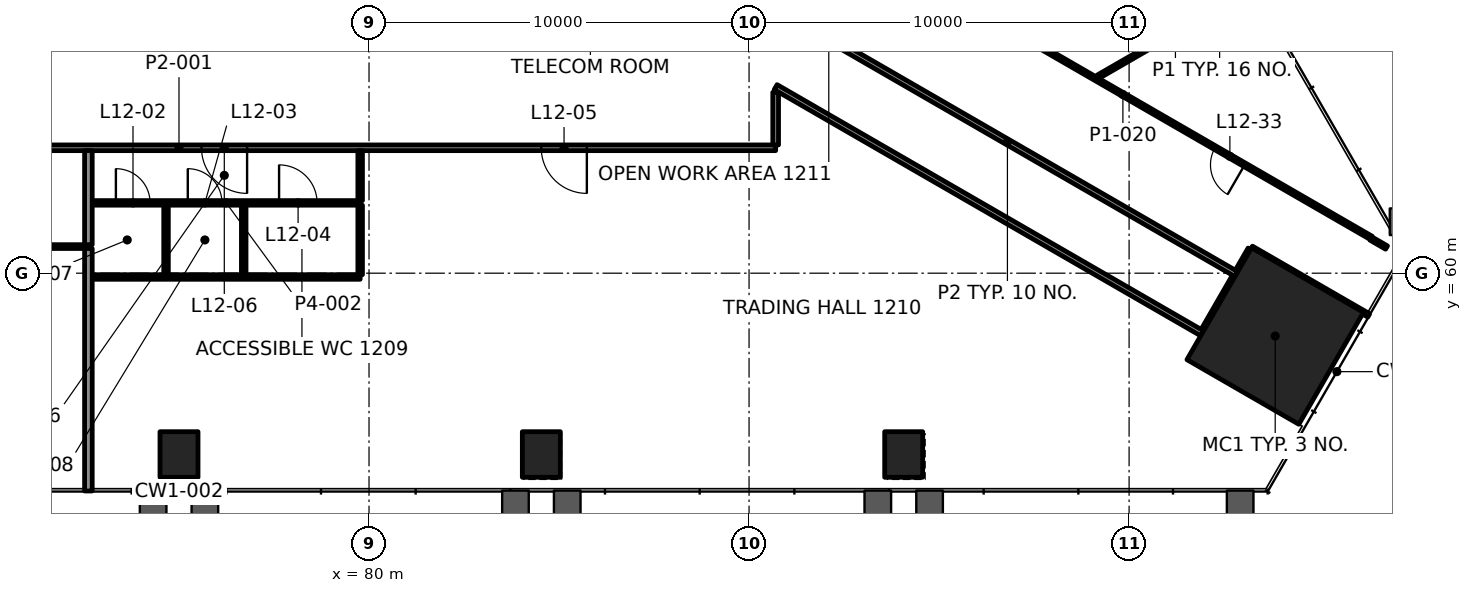
"""IFC4 building model, lengths in metres.
Left out: names, types, materials, properties, quantities, classifications, styles, units other than length and angle.
Written with IfcOpenShell. Run it as: python <this file> out.ifc"""

import sys

from ifc_helpers import new_model, si_unit, direction, frame, frame_2d, origin, origin_2d, place, context, subcontext, project, spatial, rectangle, extrude, element, fill, save


model = new_model("IFC4")
c1 = context("Model", 3, precision=1e-05, world=origin(), true_north=direction((0.0, 1.0)))
c2 = subcontext(c1, "Body", "Model", "MODEL_VIEW")
j1 = project(units=[si_unit("LENGTHUNIT", "METRE"), si_unit("PLANEANGLEUNIT", "RADIAN")], contexts=[c1])
p1 = place(None, origin())
s1 = spatial("IfcSite", under=j1, at=p1, CompositionType="ELEMENT")
p2 = place(p1, origin())
s2 = spatial("IfcBuilding", under=s1, at=p2, CompositionType="ELEMENT")
p3 = place(p2, frame((0.0, 0.0, 56.8)))
s3 = spatial("IfcBuildingStorey", under=s2, at=p3, CompositionType="ELEMENT", Elevation=56.8)
p4 = place(p3, frame((103.844, 58.347, 0.0), z_axis=(0.0, 0.0, 1.0), x_axis=(0.5, 0.866025403784, 0.0)))
e1 = element("IfcColumn", 1, at=p4, inside=s3, PredefinedType="COLUMN", context=c2, shape_type="SweptSolid", body=[
    extrude(rectangle(XDim=3.4, YDim=3.4, at=origin_2d()), origin(), (0.0, 0.0, 1.0), 4.2),
])
for number, where, z_axis, x_axis in (
    (2, (75.0, 55.229, -0.0), (0.0, 0.0, 1.0), (1.0, 0.0, 0.0)),
    (3, (84.534, 55.229, -0.0), (0.0, 0.0, 1.0), (1.0, 0.0, 0.0)),
    (4, (94.069, 55.229, -0.0), (0.0, 0.0, 1.0), (1.0, 0.0, 0.0)),
):
    element("IfcColumn", number, at=place(p3, frame(where, z_axis=z_axis, x_axis=x_axis)), inside=s3, PredefinedType="COLUMN", context=c2, shape_type="SweptSolid", body=[
        extrude(rectangle(XDim=1.0, YDim=1.2, at=origin_2d()), origin(), (0.0, 0.0, 1.0), 4.2),
    ])
p5 = place(p3, frame((72.717, 59.9, 0.0), z_axis=(0.0, 0.0, 1.0), x_axis=(1.0, 0.0, 0.0)))
e5 = element("IfcWall", 5, at=p5, inside=s3, PredefinedType="PARTITIONING", context=c2, shape_type="SweptSolid", body=[
    extrude(rectangle(XDim=7.05, YDim=0.12, at=frame_2d((3.525, 0.0))), origin(), (0.0, 0.0, 1.0), 3.4),
])
p6 = place(p3, frame((57.232, 60.7, 0.0), z_axis=(0.0, 0.0, 1.0), x_axis=(1.0, 0.0, 0.0)))
e6 = element("IfcWall", 6, at=p6, inside=s3, PredefinedType="PARTITIONING", context=c2, shape_type="SweptSolid", body=[
    extrude(rectangle(XDim=15.385, YDim=0.1, at=frame_2d((7.692, 0.0))), origin(), (0.0, 0.0, 1.0), 3.4),
])
p7 = place(p6, frame((7.192, 0.0, 0.0)))
e7 = element("IfcOpeningElement", 7, at=p7, cuts=e6, PredefinedType="OPENING", context=c2, shape_type="SweptSolid", body=[
    extrude(rectangle(XDim=1.0, YDim=2.1, at=frame_2d((0.5, 1.05))), frame((0.0, 0.06, 0.0), z_axis=(0.0, -1.0, 0.0), x_axis=(1.0, 0.0, 0.0)), (0.0, 0.0, 1.0), 0.12),
])
p8 = place(p3, frame((72.716, 61.85, 0.0), z_axis=(0.0, 0.0, 1.0), x_axis=(1.0, 0.0, 0.0)))
e8 = element("IfcWall", 8, at=p8, inside=s3, PredefinedType="PARTITIONING", context=c2, shape_type="SweptSolid", body=[
    extrude(rectangle(XDim=7.051, YDim=0.12, at=frame_2d((3.525, 0.0))), origin(), (0.0, 0.0, 1.0), 3.4),
])
p9 = place(p8, frame((0.623, 0.0, 0.0)))
e9 = element("IfcOpeningElement", 9, at=p9, cuts=e8, PredefinedType="OPENING", context=c2, shape_type="SweptSolid", body=[
    extrude(rectangle(XDim=0.9, YDim=2.1, at=frame_2d((0.45, 1.05))), frame((0.0, 0.07, 0.0), z_axis=(0.0, -1.0, 0.0), x_axis=(1.0, 0.0, 0.0)), (0.0, 0.0, 1.0), 0.14),
])
p10 = place(p8, frame((2.515, 0.0, 0.0)))
e10 = element("IfcOpeningElement", 10, at=p10, cuts=e8, PredefinedType="OPENING", context=c2, shape_type="SweptSolid", body=[
    extrude(rectangle(XDim=0.9, YDim=2.1, at=frame_2d((0.45, 1.05))), frame((0.0, 0.07, 0.0), z_axis=(0.0, -1.0, 0.0), x_axis=(1.0, 0.0, 0.0)), (0.0, 0.0, 1.0), 0.14),
])
p11 = place(p8, frame((4.917, 0.0, 0.0)))
e11 = element("IfcOpeningElement", 11, at=p11, cuts=e8, PredefinedType="OPENING", context=c2, shape_type="SweptSolid", body=[
    extrude(rectangle(XDim=1.0, YDim=2.1, at=frame_2d((0.5, 1.05))), frame((0.0, 0.07, 0.0), z_axis=(0.0, -1.0, 0.0), x_axis=(1.0, 0.0, 0.0)), (0.0, 0.0, 1.0), 0.14),
])
p12 = place(p3, frame((90.699, 63.3, 0.0), z_axis=(0.0, 0.0, 1.0), x_axis=(-1.0, 0.0, 0.0)))
e12 = element("IfcWall", 12, at=p12, inside=s3, PredefinedType="PARTITIONING", context=c2, shape_type="SweptSolid", body=[
    extrude(rectangle(XDim=31.399, YDim=0.15, at=frame_2d((15.7, 0.0))), origin(), (0.0, 0.0, 1.0), 3.4),
])
p13 = place(p12, frame((4.968, 0.0, 0.0)))
e13 = element("IfcOpeningElement", 13, at=p13, cuts=e12, PredefinedType="OPENING", context=c2, shape_type="SweptSolid", body=[
    extrude(rectangle(XDim=1.2, YDim=2.1, at=frame_2d((0.6, 1.05))), frame((0.0, 0.085, 0.0), z_axis=(0.0, -1.0, 0.0), x_axis=(1.0, 0.0, 0.0)), (0.0, 0.0, 1.0), 0.17),
])
p14 = place(p12, frame((13.908, 0.0, 0.0)))
e14 = element("IfcOpeningElement", 14, at=p14, cuts=e12, PredefinedType="OPENING", context=c2, shape_type="SweptSolid", body=[
    extrude(rectangle(XDim=1.2, YDim=2.1, at=frame_2d((0.6, 1.05))), frame((0.0, 0.085, 0.0), z_axis=(0.0, -1.0, 0.0), x_axis=(1.0, 0.0, 0.0)), (0.0, 0.0, 1.0), 0.17),
])
p15 = place(p12, frame((24.14, 0.0, 0.0)))
e15 = element("IfcOpeningElement", 15, at=p15, cuts=e12, PredefinedType="OPENING", context=c2, shape_type="SweptSolid", body=[
    extrude(rectangle(XDim=1.0, YDim=2.1, at=frame_2d((0.5, 1.05))), frame((0.0, 0.085, 0.0), z_axis=(0.0, -1.0, 0.0), x_axis=(1.0, 0.0, 0.0)), (0.0, 0.0, 1.0), 0.17),
])
p16 = place(p3, frame((99.182, 65.168, 0.0), z_axis=(0.0, 0.0, 1.0), x_axis=(0.866024864377, 0.50000093428, 0.0)))
e16 = element("IfcWall", 16, at=p16, inside=s3, PredefinedType="PARTITIONING", context=c2, shape_type="SweptSolid", body=[
    extrude(rectangle(XDim=4.705, YDim=0.1, at=frame_2d((2.353, 0.0))), origin(), (0.0, 0.0, 1.0), 3.4),
])
p17 = place(p3, frame((101.96, 58.482, 0.0), z_axis=(0.0, 0.0, 1.0), x_axis=(0.500102515474, 0.865966208357, 0.0)))
e17 = element("IfcWall", 17, at=p17, inside=s3, PredefinedType="PARTITIONING", context=c2, shape_type="SweptSolid", body=[
    extrude(rectangle(XDim=1.65, YDim=0.15, at=frame_2d((0.825, 0.0))), origin(), (0.0, 0.0, 1.0), 3.247),
])
p18 = place(p3, frame((90.7, 63.375, 0.0), z_axis=(0.0, 0.0, 1.0), x_axis=(0.0, 1.0, 0.0)))
e18 = element("IfcWall", 18, at=p18, inside=s3, PredefinedType="PARTITIONING", context=c2, shape_type="SweptSolid", body=[
    extrude(rectangle(XDim=1.384, YDim=0.15, at=frame_2d((0.692, 0.0))), origin(), (0.0, 0.0, 1.0), 3.247),
])
p19 = place(p3, frame((79.767, 59.96, 0.0), z_axis=(0.0, 0.0, 1.0), x_axis=(0.0, 1.0, 0.0)))
e19 = element("IfcWall", 19, at=p19, inside=s3, PredefinedType="PARTITIONING", context=c2, shape_type="SweptSolid", body=[
    extrude(rectangle(XDim=1.83, YDim=0.12, at=frame_2d((0.915, 0.0))), origin(), (0.0, 0.0, 1.0), 3.4),
])
for number, where, z_axis, x_axis in (
    (20, (76.703, 59.96, 0.0), (0.0, 0.0, 1.0), (0.0, 1.0, 0.0)),
    (21, (74.659, 59.96, 0.0), (0.0, 0.0, 1.0), (0.0, 1.0, 0.0)),
):
    element("IfcWall", number, at=place(p3, frame(where, z_axis=z_axis, x_axis=x_axis)), inside=s3, PredefinedType="PARTITIONING", context=c2, shape_type="SweptSolid", body=[
        extrude(rectangle(XDim=1.83, YDim=0.12, at=frame_2d((0.915, 0.0))), origin(), (0.0, 0.0, 1.0), 3.4),
    ])
p20 = place(p3, frame((72.616, 54.269, 0.0), z_axis=(0.0, 0.0, 1.0), x_axis=(0.0, 1.0, 0.0)))
e22 = element("IfcWall", 22, at=p20, inside=s3, PredefinedType="PARTITIONING", context=c2, shape_type="SweptSolid", body=[
    extrude(rectangle(XDim=6.381, YDim=0.2, at=frame_2d((3.19, 0.0))), origin(), (0.0, 0.0, 1.0), 3.165),
])
p21 = place(p3, frame((106.374, 60.928, 0.0), z_axis=(0.0, 0.0, 1.0), x_axis=(-0.866022109353, 0.50000570608, 0.0)))
e23 = element("IfcWall", 23, at=p21, inside=s3, PredefinedType="PARTITIONING", context=c2, shape_type="SweptSolid", body=[
    extrude(rectangle(XDim=15.096, YDim=0.1, at=frame_2d((7.548, 0.0))), origin(), (0.0, 0.0, 1.0), 3.4),
])
p22 = place(p21, frame((3.847, 0.0, 0.0)))
e24 = element("IfcOpeningElement", 24, at=p22, cuts=e23, PredefinedType="OPENING", context=c2, shape_type="SweptSolid", body=[
    extrude(rectangle(XDim=0.9, YDim=2.1, at=frame_2d((0.45, 1.05))), frame((0.0, 0.06, 0.0), z_axis=(0.0, -1.0, 0.0), x_axis=(1.0, 0.0, 0.0)), (0.0, 0.0, 1.0), 0.12),
])
p23 = place(p3, frame((106.774, 60.675, 0.0), z_axis=(0.0, 0.0, 1.0), x_axis=(-0.865979310119, 0.500079828073, 0.0)))
e25 = element("IfcWall", 25, at=p23, inside=s3, PredefinedType="PARTITIONING", context=c2, shape_type="SweptSolid", body=[
    extrude(rectangle(XDim=0.473, YDim=0.1, at=frame_2d((0.237, 0.0))), origin(), (0.0, 0.0, 1.0), 3.4),
])
p24 = place(p3, frame((106.305, 58.888, 0.0), z_axis=(0.0, 0.0, 1.0), x_axis=(-0.866061095881, 0.499938174379, 0.0)))
e26 = element("IfcWall", 26, at=p24, inside=s3, PredefinedType="PARTITIONING", context=c2, shape_type="SweptSolid", body=[
    extrude(rectangle(XDim=3.56, YDim=0.1, at=frame_2d((1.78, 0.0))), origin(), (0.0, 0.0, 1.0), 3.4),
])
p25 = place(p3, frame((102.822, 59.976, 0.0), z_axis=(0.0, 0.0, 1.0), x_axis=(-0.866019280802, 0.500010605167, 0.0)))
e27 = element("IfcWall", 27, at=p25, inside=s3, PredefinedType="PARTITIONING", context=c2, shape_type="SweptSolid", body=[
    extrude(rectangle(XDim=13.91, YDim=0.15, at=frame_2d((6.955, 0.0))), origin(), (0.0, 0.0, 1.0), 3.4),
])
p26 = place(p3, frame((101.922, 58.417, 0.0), z_axis=(0.0, 0.0, 1.0), x_axis=(-0.866024629744, 0.500001340675, 0.0)))
e28 = element("IfcWall", 28, at=p26, inside=s3, PredefinedType="PARTITIONING", context=c2, shape_type="SweptSolid", body=[
    extrude(rectangle(XDim=12.958, YDim=0.15, at=frame_2d((6.479, 0.0))), origin(), (0.0, 0.0, 1.0), 3.247),
])
p27 = place(p3, frame((72.616, 60.75, 0.0), z_axis=(0.0, 0.0, 1.0), x_axis=(0.0, 1.0, 0.0)))
e29 = element("IfcWall", 29, at=p27, inside=s3, PredefinedType="PARTITIONING", context=c2, shape_type="SweptSolid", body=[
    extrude(rectangle(XDim=2.475, YDim=0.2, at=frame_2d((1.238, 0.0))), origin(), (0.0, 0.0, 1.0), 3.4),
])
p28 = place(p3, frame((79.767, 61.91, 0.0), z_axis=(0.0, 0.0, 1.0), x_axis=(0.0, 1.0, 0.0)))
e30 = element("IfcWall", 30, at=p28, inside=s3, PredefinedType="PARTITIONING", context=c2, shape_type="SweptSolid", body=[
    extrude(rectangle(XDim=1.315, YDim=0.12, at=frame_2d((0.657, 0.0))), origin(), (0.0, 0.0, 1.0), 3.4),
])
p29 = place(p3, frame((102.86, 60.041, 0.0), z_axis=(0.0, 0.0, 1.0), x_axis=(0.500036104519, 0.866004557827, 0.0)))
e31 = element("IfcWall", 31, at=p29, inside=s3, PredefinedType="PARTITIONING", context=c2, shape_type="SweptSolid", body=[
    extrude(rectangle(XDim=0.674, YDim=0.15, at=frame_2d((0.337, 0.0))), origin(), (0.0, 0.0, 1.0), 3.4),
])
p30 = place(p9, origin())
e32 = element("IfcDoor", 32, at=p30, inside=s3, OperationType="SINGLE_SWING_RIGHT", PredefinedType="DOOR", context=c2, shape_type="SweptSolid", body=[
    extrude(rectangle(XDim=0.9, YDim=2.1, at=frame_2d((0.45, 1.05))), frame((0.0, 0.025, 0.0), z_axis=(0.0, -1.0, 0.0), x_axis=(1.0, 0.0, 0.0)), (0.0, 0.0, 1.0), 0.05),
])
fill(e9, e32)
p31 = place(p10, origin())
e33 = element("IfcDoor", 33, at=p31, inside=s3, OperationType="SINGLE_SWING_LEFT", PredefinedType="DOOR", context=c2, shape_type="SweptSolid", body=[
    extrude(rectangle(XDim=0.9, YDim=2.1, at=frame_2d((0.45, 1.05))), frame((0.0, 0.025, 0.0), z_axis=(0.0, -1.0, 0.0), x_axis=(1.0, 0.0, 0.0)), (0.0, 0.0, 1.0), 0.05),
])
fill(e10, e33)
p32 = place(p11, origin())
e34 = element("IfcDoor", 34, at=p32, inside=s3, OperationType="SINGLE_SWING_RIGHT", PredefinedType="DOOR", context=c2, shape_type="SweptSolid", body=[
    extrude(rectangle(XDim=1.0, YDim=2.1, at=frame_2d((0.5, 1.05))), frame((0.0, 0.025, 0.0), z_axis=(0.0, -1.0, 0.0), x_axis=(1.0, 0.0, 0.0)), (0.0, 0.0, 1.0), 0.05),
])
fill(e11, e34)
p33 = place(p13, origin())
e35 = element("IfcDoor", 35, at=p33, inside=s3, OperationType="DOUBLE_DOOR_SINGLE_SWING", PredefinedType="DOOR", context=c2, shape_type="SweptSolid", body=[
    extrude(rectangle(XDim=1.2, YDim=2.1, at=frame_2d((0.6, 1.05))), frame((0.0, 0.025, 0.0), z_axis=(0.0, -1.0, 0.0), x_axis=(1.0, 0.0, 0.0)), (0.0, 0.0, 1.0), 0.05),
])
fill(e13, e35)
p34 = place(p14, origin())
e36 = element("IfcDoor", 36, at=p34, inside=s3, OperationType="DOUBLE_DOOR_SINGLE_SWING", PredefinedType="DOOR", context=c2, shape_type="SweptSolid", body=[
    extrude(rectangle(XDim=1.2, YDim=2.1, at=frame_2d((0.6, 1.05))), frame((0.0, 0.025, 0.0), z_axis=(0.0, -1.0, 0.0), x_axis=(1.0, 0.0, 0.0)), (0.0, 0.0, 1.0), 0.05),
])
fill(e14, e36)
p35 = place(p22, origin())
e37 = element("IfcDoor", 37, at=p35, inside=s3, OperationType="SINGLE_SWING_LEFT", PredefinedType="DOOR", context=c2, shape_type="SweptSolid", body=[
    extrude(rectangle(XDim=0.9, YDim=2.1, at=frame_2d((0.45, 1.05))), frame((0.0, 0.025, 0.0), z_axis=(0.0, -1.0, 0.0), x_axis=(1.0, 0.0, 0.0)), (0.0, 0.0, 1.0), 0.05),
])
fill(e24, e37)
save(model, sys.argv[1])
